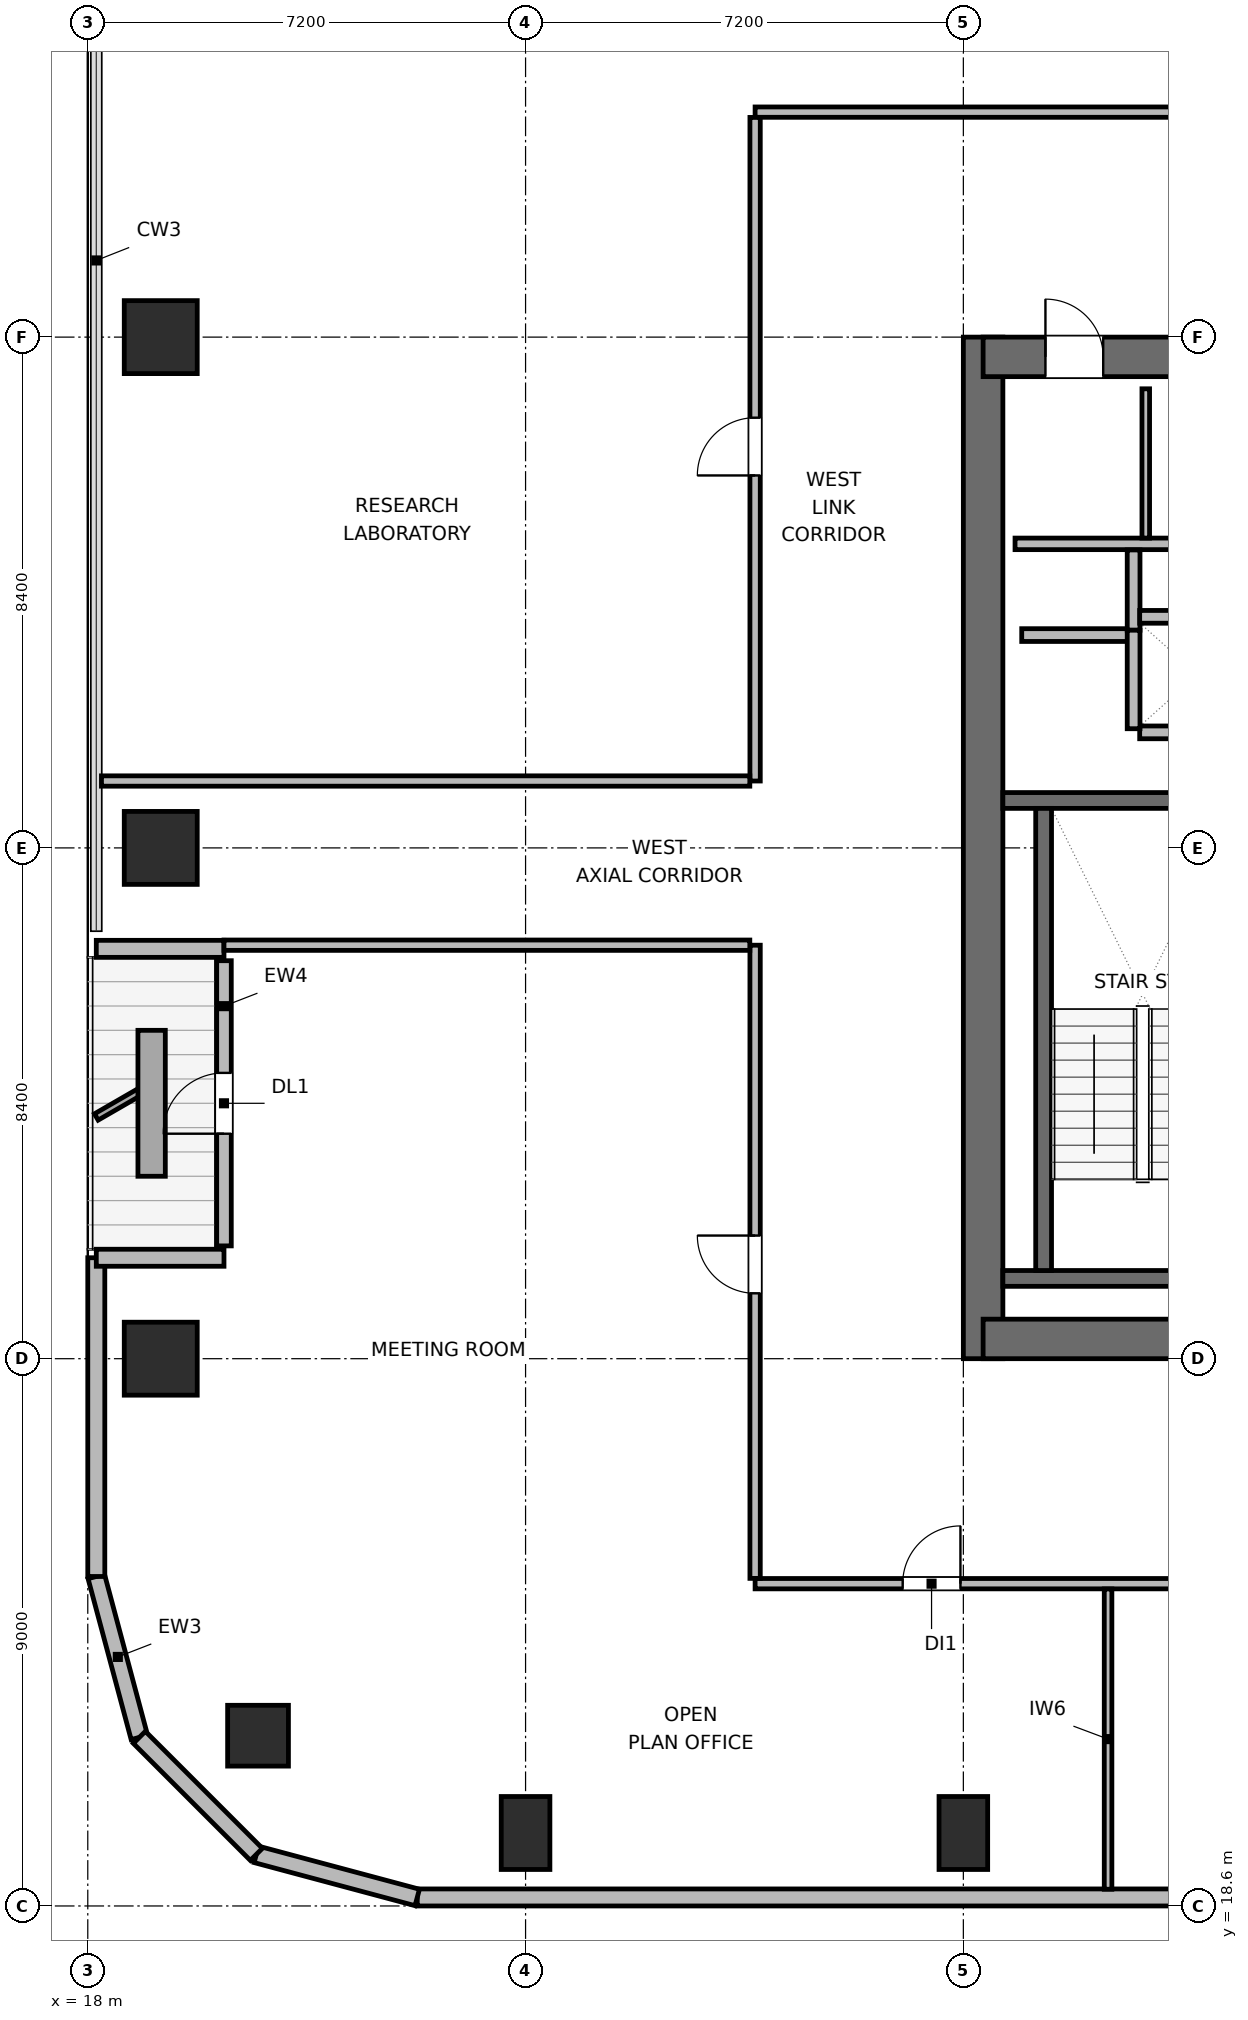
"""IFC4 building model, lengths in metres.
Left out: names, types, materials, properties, quantities, classifications, styles, units other than length and angle.
Written with IfcOpenShell. Run it as: python <this file> out.ifc"""

import sys

from ifc_helpers import new_model, si_unit, direction, frame, frame_2d, origin, origin_2d, place, context, subcontext, project, spatial, rectangle, circle, extrude, element, fill, save


model = new_model("IFC4")
c1 = context("Model", 3, precision=1e-05, world=origin(), true_north=direction((0.0, 1.0)))
c2 = subcontext(c1, "Body", "Model", "MODEL_VIEW")
j1 = project(units=[si_unit("LENGTHUNIT", "METRE"), si_unit("PLANEANGLEUNIT", "RADIAN")], contexts=[c1])
p1 = place(None, origin())
s1 = spatial("IfcSite", under=j1, at=p1, CompositionType="ELEMENT")
p2 = place(p1, origin())
s2 = spatial("IfcBuilding", under=s1, at=p2, CompositionType="ELEMENT")
p3 = place(p2, frame((0.0, 0.0, 201.9)))
s3 = spatial("IfcBuildingStorey", under=s2, at=p3, CompositionType="ELEMENT", Elevation=201.9)
p4 = place(p3, frame((32.725, 27.6, 0.0), z_axis=(0.0, 0.0, 1.0), x_axis=(0.0, 1.0, 0.0)))
e1 = element("IfcWall", 1, at=p4, inside=s3, PredefinedType="SHEAR", context=c2, shape_type="SweptSolid", body=[
    extrude(rectangle(XDim=16.8, YDim=0.65, at=frame_2d((8.4, 0.0))), origin(), (0.0, 0.0, 1.0), 3.9),
])
p5 = place(p3, frame((32.725, 27.925, 0.0), z_axis=(0.0, 0.0, 1.0), x_axis=(1.0, 0.0, 0.0)))
e2 = element("IfcWall", 2, at=p5, inside=s3, PredefinedType="SHEAR", context=c2, shape_type="SweptSolid", body=[
    extrude(rectangle(XDim=9.35, YDim=0.65, at=frame_2d((4.675, 0.0))), origin(), (0.0, 0.0, 1.0), 3.9),
])
p6 = place(p5, frame((5.025, 0.0, 0.0)))
e3 = element("IfcOpeningElement", 3, at=p6, cuts=e2, PredefinedType="OPENING", context=c2, shape_type="SweptSolid", body=[
    extrude(rectangle(XDim=1.05, YDim=2.04, at=frame_2d((0.525, 1.02))), frame((0.0, 0.335, 0.0), z_axis=(0.0, -1.0, 0.0), x_axis=(1.0, 0.0, 0.0)), (0.0, 0.0, 1.0), 0.67),
])
p7 = place(p3, frame((32.725, 44.075, 0.0), z_axis=(0.0, 0.0, 1.0), x_axis=(1.0, 0.0, 0.0)))
e4 = element("IfcWall", 4, at=p7, inside=s3, PredefinedType="SHEAR", context=c2, shape_type="SweptSolid", body=[
    extrude(rectangle(XDim=9.35, YDim=0.65, at=frame_2d((4.675, 0.0))), origin(), (0.0, 0.0, 1.0), 3.9),
])
p8 = place(p7, frame((1.025, 0.0, 0.0)))
e5 = element("IfcOpeningElement", 5, at=p8, cuts=e4, PredefinedType="OPENING", context=c2, shape_type="SweptSolid", body=[
    extrude(rectangle(XDim=0.95, YDim=2.04, at=frame_2d((0.475, 1.02))), frame((0.0, 0.335, 0.0), z_axis=(0.0, -1.0, 0.0), x_axis=(1.0, 0.0, 0.0)), (0.0, 0.0, 1.0), 0.67),
])
p9 = place(p7, frame((4.275, 0.0, 0.0)))
e6 = element("IfcOpeningElement", 6, at=p9, cuts=e4, PredefinedType="OPENING", context=c2, shape_type="SweptSolid", body=[
    extrude(rectangle(XDim=0.9, YDim=2.02, at=frame_2d((0.45, 1.01))), frame((0.0, 0.335, 0.0), z_axis=(0.0, -1.0, 0.0), x_axis=(1.0, 0.0, 0.0)), (0.0, 0.0, 1.0), 0.67),
])
p10 = place(p7, frame((7.175, 0.0, 0.0)))
e7 = element("IfcOpeningElement", 7, at=p10, cuts=e4, PredefinedType="OPENING", context=c2, shape_type="SweptSolid", body=[
    extrude(rectangle(XDim=0.9, YDim=2.02, at=frame_2d((0.45, 1.01))), frame((0.0, 0.335, 0.0), z_axis=(0.0, -1.0, 0.0), x_axis=(1.0, 0.0, 0.0)), (0.0, 0.0, 1.0), 0.67),
])
for number, where, z_axis, x_axis in (
    (8, (33.05, 28.92, 0.0), (0.0, 0.0, 1.0), (1.0, 0.0, 0.0)),
    (9, (33.05, 36.78, 0.0), (0.0, 0.0, 1.0), (1.0, 0.0, 0.0)),
):
    element("IfcWall", number, at=place(p3, frame(where, z_axis=z_axis, x_axis=x_axis)), inside=s3, PredefinedType="SHEAR", context=c2, shape_type="SweptSolid", body=[
        extrude(rectangle(XDim=4.06, YDim=0.26, at=frame_2d((2.03, 0.0))), origin(), (0.0, 0.0, 1.0), 3.9),
    ])
p11 = place(p3, frame((33.72, 29.05, 0.0), z_axis=(0.0, 0.0, 1.0), x_axis=(0.0, 1.0, 0.0)))
e10 = element("IfcWall", 10, at=p11, inside=s3, PredefinedType="SHEAR", context=c2, shape_type="SweptSolid", body=[
    extrude(rectangle(XDim=7.6, YDim=0.26, at=frame_2d((3.8, 0.0))), origin(), (0.0, 0.0, 1.0), 3.9),
])
p12 = place(p3, frame((20.8, 21.4, 0.0), z_axis=(0.0, 0.0, 1.0), x_axis=(1.0, 0.0, 0.0)))
e11 = element("IfcColumn", 11, at=p12, inside=s3, PredefinedType="COLUMN", context=c2, shape_type="SweptSolid", body=[
    extrude(circle(Radius=0.5, at=origin_2d()), origin(), (0.0, 0.0, 1.0), 3.9),
])
for number, where, z_axis, x_axis in (
    (12, (25.2, 19.8, 0.0), (0.0, 0.0, 1.0), (1.0, 0.0, 0.0)),
    (13, (32.4, 19.8, 0.0), (0.0, 0.0, 1.0), (1.0, 0.0, 0.0)),
):
    element("IfcColumn", number, at=place(p3, frame(where, z_axis=z_axis, x_axis=x_axis)), inside=s3, PredefinedType="COLUMN", context=c2, shape_type="SweptSolid", body=[
        extrude(rectangle(XDim=0.8, YDim=1.2, at=origin_2d()), origin(), (0.0, 0.0, 1.0), 3.9),
    ])
for number, where, z_axis, x_axis in (
    (14, (19.2, 27.6, 0.0), (0.0, 0.0, 1.0), (1.0, 0.0, 0.0)),
    (15, (19.2, 36.0, 0.0), (0.0, 0.0, 1.0), (1.0, 0.0, 0.0)),
    (16, (19.2, 44.4, 0.0), (0.0, 0.0, 1.0), (1.0, 0.0, 0.0)),
):
    element("IfcColumn", number, at=place(p3, frame(where, z_axis=z_axis, x_axis=x_axis)), inside=s3, PredefinedType="COLUMN", context=c2, shape_type="SweptSolid", body=[
        extrude(rectangle(XDim=1.2, YDim=1.2, at=origin_2d()), origin(), (0.0, 0.0, 1.0), 3.9),
    ])
p13 = place(p3, frame((18.848, 21.373, 0.0), z_axis=(0.0, 0.0, 1.0), x_axis=(-0.258672222976, 0.9659651552, 0.0)))
e17 = element("IfcWall", 17, at=p13, inside=s3, PredefinedType="SOLIDWALL", context=c2, shape_type="SweptSolid", body=[
    extrude(rectangle(XDim=2.739, YDim=0.28, at=frame_2d((1.37, 0.0))), origin(), (0.0, 0.0, 1.0), 3.68),
])
p14 = place(p3, frame((18.14, 24.018, 0.0), z_axis=(0.0, 0.0, 1.0), x_axis=(0.0, 1.0, 0.0)))
e18 = element("IfcWall", 18, at=p14, inside=s3, PredefinedType="SOLIDWALL", context=c2, shape_type="SweptSolid", body=[
    extrude(rectangle(XDim=5.242, YDim=0.28, at=frame_2d((2.621, 0.0))), origin(), (0.0, 0.0, 1.0), 3.68),
])
p15 = place(p3, frame((18.14, 29.26, 0.0), z_axis=(0.0, 0.0, 1.0), x_axis=(1.0, 0.0, 0.0)))
e19 = element("IfcWall", 19, at=p15, inside=s3, PredefinedType="SOLIDWALL", context=c2, shape_type="SweptSolid", body=[
    extrude(rectangle(XDim=2.1, YDim=0.28, at=frame_2d((1.05, 0.0))), origin(), (0.0, 0.0, 1.0), 3.116),
])
p16 = place(p3, frame((20.24, 29.455, 0.0), z_axis=(0.0, 0.0, 1.0), x_axis=(0.0, 1.0, 0.0)))
e20 = element("IfcWall", 20, at=p16, inside=s3, PredefinedType="SOLIDWALL", context=c2, shape_type="SweptSolid", body=[
    extrude(rectangle(XDim=4.69, YDim=0.24, at=frame_2d((2.345, 0.0))), origin(), (0.0, 0.0, 1.0), 3.248),
])
p17 = place(p16, frame((1.845, 0.0, 0.0)))
e21 = element("IfcOpeningElement", 21, at=p17, cuts=e20, PredefinedType="OPENING", context=c2, shape_type="SweptSolid", body=[
    extrude(rectangle(XDim=1.0, YDim=2.02, at=frame_2d((0.5, 1.01))), frame((0.0, 0.13, 0.0), z_axis=(0.0, -1.0, 0.0), x_axis=(1.0, 0.0, 0.0)), (0.0, 0.0, 1.0), 0.26),
])
p18 = place(p3, frame((20.24, 34.34, 0.0), z_axis=(0.0, 0.0, 1.0), x_axis=(-1.0, 0.0, 0.0)))
e22 = element("IfcWall", 22, at=p18, inside=s3, PredefinedType="SOLIDWALL", context=c2, shape_type="SweptSolid", body=[
    extrude(rectangle(XDim=2.1, YDim=0.28, at=frame_2d((1.05, 0.0))), origin(), (0.0, 0.0, 1.0), 3.116),
])
p19 = place(p3, frame((41.36, 18.74, 0.0), z_axis=(0.0, 0.0, 1.0), x_axis=(-1.0, 0.0, 0.0)))
e23 = element("IfcWall", 23, at=p19, inside=s3, PredefinedType="SOLIDWALL", context=c2, shape_type="SweptSolid", body=[
    extrude(rectangle(XDim=17.942, YDim=0.28, at=frame_2d((8.971, 0.0))), origin(), (0.0, 0.0, 1.0), 3.68),
])
p20 = place(p3, frame((23.418, 18.74, 0.0), z_axis=(0.0, 0.0, 1.0), x_axis=(-0.965971118627, 0.258649952598, 0.0)))
e24 = element("IfcWall", 24, at=p20, inside=s3, PredefinedType="SOLIDWALL", context=c2, shape_type="SweptSolid", body=[
    extrude(rectangle(XDim=2.739, YDim=0.28, at=frame_2d((1.37, 0.0))), origin(), (0.0, 0.0, 1.0), 3.68),
])
p21 = place(p3, frame((20.772, 19.448, 0.0), z_axis=(0.0, 0.0, 1.0), x_axis=(-0.707106781187, 0.707106781187, 0.0)))
e25 = element("IfcWall", 25, at=p21, inside=s3, PredefinedType="SOLIDWALL", context=c2, shape_type="SweptSolid", body=[
    extrude(rectangle(XDim=2.721, YDim=0.28, at=frame_2d((1.36, 0.0))), origin(), (0.0, 0.0, 1.0), 3.68),
])
p22 = place(p3, frame((33.25, 41.0, 0.0), z_axis=(0.0, 0.0, 1.0), x_axis=(1.0, 0.0, 0.0)))
e26 = element("IfcWall", 26, at=p22, inside=s3, PredefinedType="PLUMBINGWALL", context=c2, shape_type="SweptSolid", body=[
    extrude(rectangle(XDim=8.3, YDim=0.19, at=frame_2d((4.15, 0.0))), origin(), (0.0, 0.0, 1.0), 3.68),
])
p23 = place(p3, frame((35.4, 41.095, 0.0), z_axis=(0.0, 0.0, 1.0), x_axis=(0.0, 1.0, 0.0)))
e27 = element("IfcWall", 27, at=p23, inside=s3, PredefinedType="PARTITIONING", context=c2, shape_type="SweptSolid", body=[
    extrude(rectangle(XDim=2.455, YDim=0.125, at=frame_2d((1.228, 0.0))), origin(), (0.0, 0.0, 1.0), 3.68),
])
p24 = place(p3, frame((33.36, 39.5, 0.0), z_axis=(0.0, 0.0, 1.0), x_axis=(1.0, 0.0, 0.0)))
e28 = element("IfcWall", 28, at=p24, inside=s3, PredefinedType="PARTITIONING", context=c2, shape_type="SweptSolid", body=[
    extrude(rectangle(XDim=1.86, YDim=0.21, at=frame_2d((0.93, 0.0))), origin(), (0.0, 0.0, 1.0), 3.68),
])
p25 = place(p3, frame((35.2, 39.58, 0.0), z_axis=(0.0, 0.0, 1.0), x_axis=(0.0, 1.0, 0.0)))
e29 = element("IfcWall", 29, at=p25, inside=s3, PredefinedType="PARTITIONING", context=c2, shape_type="SweptSolid", body=[
    extrude(rectangle(XDim=1.32, YDim=0.21, at=frame_2d((0.66, 0.0))), origin(), (0.0, 0.0, 1.0), 3.68),
])
for number, where, z_axis, x_axis in (
    (30, (35.3, 37.9, 0.0), (0.0, 0.0, 1.0), (1.0, 0.0, 0.0)),
    (31, (35.3, 39.8, 0.0), (0.0, 0.0, 1.0), (1.0, 0.0, 0.0)),
):
    element("IfcWall", number, at=place(p3, frame(where, z_axis=z_axis, x_axis=x_axis)), inside=s3, PredefinedType="PARTITIONING", context=c2, shape_type="SweptSolid", body=[
        extrude(rectangle(XDim=1.9, YDim=0.21, at=frame_2d((0.95, 0.0))), origin(), (0.0, 0.0, 1.0), 3.68),
    ])
p26 = place(p3, frame((35.2, 37.96, 0.0), z_axis=(0.0, 0.0, 1.0), x_axis=(0.0, 1.0, 0.0)))
e32 = element("IfcWall", 32, at=p26, inside=s3, PredefinedType="PARTITIONING", context=c2, shape_type="SweptSolid", body=[
    extrude(rectangle(XDim=1.62, YDim=0.21, at=frame_2d((0.81, 0.0))), origin(), (0.0, 0.0, 1.0), 3.68),
])
p27 = place(p3, frame((28.975, 23.9, 0.0), z_axis=(0.0, 0.0, 1.0), x_axis=(1.0, 0.0, 0.0)))
e33 = element("IfcWall", 33, at=p27, inside=s3, PredefinedType="PARTITIONING", context=c2, shape_type="SweptSolid", body=[
    extrude(rectangle(XDim=34.625, YDim=0.17, at=frame_2d((17.312, 0.0))), origin(), (0.0, 0.0, 1.0), 3.68),
])
p28 = place(p27, frame((2.427, 0.0, 0.0)))
e34 = element("IfcOpeningElement", 34, at=p28, cuts=e33, PredefinedType="OPENING", context=c2, shape_type="SweptSolid", body=[
    extrude(rectangle(XDim=0.95, YDim=2.04, at=frame_2d((0.475, 1.02))), frame((0.0, 0.095, 0.0), z_axis=(0.0, -1.0, 0.0), x_axis=(1.0, 0.0, 0.0)), (0.0, 0.0, 1.0), 0.19),
])
p29 = place(p27, frame((7.63, 0.0, 0.0)))
e35 = element("IfcOpeningElement", 35, at=p29, cuts=e33, PredefinedType="OPENING", context=c2, shape_type="SweptSolid", body=[
    extrude(rectangle(XDim=0.95, YDim=2.04, at=frame_2d((0.475, 1.02))), frame((0.0, 0.095, 0.0), z_axis=(0.0, -1.0, 0.0), x_axis=(1.0, 0.0, 0.0)), (0.0, 0.0, 1.0), 0.19),
])
p30 = place(p27, frame((14.535, 0.0, 0.0)))
e36 = element("IfcOpeningElement", 36, at=p30, cuts=e33, PredefinedType="OPENING", context=c2, shape_type="SweptSolid", body=[
    extrude(rectangle(XDim=0.95, YDim=2.04, at=frame_2d((0.475, 1.02))), frame((0.0, 0.095, 0.0), z_axis=(0.0, -1.0, 0.0), x_axis=(1.0, 0.0, 0.0)), (0.0, 0.0, 1.0), 0.19),
])
p31 = place(p27, frame((21.44, 0.0, 0.0)))
e37 = element("IfcOpeningElement", 37, at=p31, cuts=e33, PredefinedType="OPENING", context=c2, shape_type="SweptSolid", body=[
    extrude(rectangle(XDim=0.95, YDim=2.04, at=frame_2d((0.475, 1.02))), frame((0.0, 0.095, 0.0), z_axis=(0.0, -1.0, 0.0), x_axis=(1.0, 0.0, 0.0)), (0.0, 0.0, 1.0), 0.19),
])
p32 = place(p27, frame((26.045, 0.0, 0.0)))
e38 = element("IfcOpeningElement", 38, at=p32, cuts=e33, PredefinedType="OPENING", context=c2, shape_type="SweptSolid", body=[
    extrude(rectangle(XDim=0.95, YDim=2.04, at=frame_2d((0.475, 1.02))), frame((0.0, 0.095, 0.0), z_axis=(0.0, -1.0, 0.0), x_axis=(1.0, 0.0, 0.0)), (0.0, 0.0, 1.0), 0.19),
])
p33 = place(p27, frame((31.25, 0.0, 0.0)))
e39 = element("IfcOpeningElement", 39, at=p33, cuts=e33, PredefinedType="OPENING", context=c2, shape_type="SweptSolid", body=[
    extrude(rectangle(XDim=0.95, YDim=2.04, at=frame_2d((0.475, 1.02))), frame((0.0, 0.095, 0.0), z_axis=(0.0, -1.0, 0.0), x_axis=(1.0, 0.0, 0.0)), (0.0, 0.0, 1.0), 0.19),
])
p34 = place(p3, frame((28.975, 48.1, 0.0), z_axis=(0.0, 0.0, 1.0), x_axis=(1.0, 0.0, 0.0)))
e40 = element("IfcWall", 40, at=p34, inside=s3, PredefinedType="PARTITIONING", context=c2, shape_type="SweptSolid", body=[
    extrude(rectangle(XDim=34.625, YDim=0.17, at=frame_2d((17.312, 0.0))), origin(), (0.0, 0.0, 1.0), 3.68),
])
p35 = place(p34, frame((6.832, 0.0, 0.0)))
e41 = element("IfcOpeningElement", 41, at=p35, cuts=e40, PredefinedType="OPENING", context=c2, shape_type="SweptSolid", body=[
    extrude(rectangle(XDim=0.95, YDim=2.04, at=frame_2d((0.475, 1.02))), frame((0.0, 0.095, 0.0), z_axis=(0.0, -1.0, 0.0), x_axis=(1.0, 0.0, 0.0)), (0.0, 0.0, 1.0), 0.19),
])
p36 = place(p34, frame((17.245, 0.0, 0.0)))
e42 = element("IfcOpeningElement", 42, at=p36, cuts=e40, PredefinedType="OPENING", context=c2, shape_type="SweptSolid", body=[
    extrude(rectangle(XDim=0.95, YDim=2.04, at=frame_2d((0.475, 1.02))), frame((0.0, 0.095, 0.0), z_axis=(0.0, -1.0, 0.0), x_axis=(1.0, 0.0, 0.0)), (0.0, 0.0, 1.0), 0.19),
])
p37 = place(p34, frame((21.475, 0.0, 0.0)))
e43 = element("IfcOpeningElement", 43, at=p37, cuts=e40, PredefinedType="OPENING", context=c2, shape_type="SweptSolid", body=[
    extrude(rectangle(XDim=0.95, YDim=2.04, at=frame_2d((0.475, 1.02))), frame((0.0, 0.095, 0.0), z_axis=(0.0, -1.0, 0.0), x_axis=(1.0, 0.0, 0.0)), (0.0, 0.0, 1.0), 0.19),
])
p38 = place(p34, frame((28.375, 0.0, 0.0)))
e44 = element("IfcOpeningElement", 44, at=p38, cuts=e40, PredefinedType="OPENING", context=c2, shape_type="SweptSolid", body=[
    extrude(rectangle(XDim=0.95, YDim=2.04, at=frame_2d((0.475, 1.02))), frame((0.0, 0.095, 0.0), z_axis=(0.0, -1.0, 0.0), x_axis=(1.0, 0.0, 0.0)), (0.0, 0.0, 1.0), 0.19),
])
p39 = place(p3, frame((28.975, 23.987, 0.0), z_axis=(0.0, 0.0, 1.0), x_axis=(0.0, 1.0, 0.0)))
e45 = element("IfcWall", 45, at=p39, inside=s3, PredefinedType="PARTITIONING", context=c2, shape_type="SweptSolid", body=[
    extrude(rectangle(XDim=10.413, YDim=0.17, at=frame_2d((5.207, 0.0))), origin(), (0.0, 0.0, 1.0), 3.68),
])
p40 = place(p39, frame((4.688, 0.0, 0.0)))
e46 = element("IfcOpeningElement", 46, at=p40, cuts=e45, PredefinedType="OPENING", context=c2, shape_type="SweptSolid", body=[
    extrude(rectangle(XDim=0.95, YDim=2.04, at=frame_2d((0.475, 1.02))), frame((0.0, 0.095, 0.0), z_axis=(0.0, -1.0, 0.0), x_axis=(1.0, 0.0, 0.0)), (0.0, 0.0, 1.0), 0.19),
])
p41 = place(p3, frame((28.975, 37.1, 0.0), z_axis=(0.0, 0.0, 1.0), x_axis=(0.0, 1.0, 0.0)))
e47 = element("IfcWall", 47, at=p41, inside=s3, PredefinedType="PARTITIONING", context=c2, shape_type="SweptSolid", body=[
    extrude(rectangle(XDim=10.913, YDim=0.17, at=frame_2d((5.457, 0.0))), origin(), (0.0, 0.0, 1.0), 3.68),
])
p42 = place(p41, frame((5.025, 0.0, 0.0)))
e48 = element("IfcOpeningElement", 48, at=p42, cuts=e47, PredefinedType="OPENING", context=c2, shape_type="SweptSolid", body=[
    extrude(rectangle(XDim=0.95, YDim=2.04, at=frame_2d((0.475, 1.02))), frame((0.0, 0.095, 0.0), z_axis=(0.0, -1.0, 0.0), x_axis=(1.0, 0.0, 0.0)), (0.0, 0.0, 1.0), 0.19),
])
p43 = place(p3, frame((34.78, 18.875, 0.0), z_axis=(0.0, 0.0, 1.0), x_axis=(0.0, 1.0, 0.0)))
e49 = element("IfcWall", 49, at=p43, inside=s3, PredefinedType="PARTITIONING", context=c2, shape_type="SweptSolid", body=[
    extrude(rectangle(XDim=4.938, YDim=0.125, at=frame_2d((2.469, 0.0))), origin(), (0.0, 0.0, 1.0), 3.68),
])
p44 = place(p3, frame((20.24, 34.4, 0.0), z_axis=(0.0, 0.0, 1.0), x_axis=(1.0, 0.0, 0.0)))
e50 = element("IfcWall", 50, at=p44, inside=s3, PredefinedType="PARTITIONING", context=c2, shape_type="SweptSolid", body=[
    extrude(rectangle(XDim=8.648, YDim=0.17, at=frame_2d((4.324, 0.0))), origin(), (0.0, 0.0, 1.0), 3.68),
])
p45 = place(p3, frame((18.225, 37.1, 0.0), z_axis=(0.0, 0.0, 1.0), x_axis=(1.0, 0.0, 0.0)))
e51 = element("IfcWall", 51, at=p45, inside=s3, PredefinedType="PARTITIONING", context=c2, shape_type="SweptSolid", body=[
    extrude(rectangle(XDim=10.663, YDim=0.17, at=frame_2d((5.332, 0.0))), origin(), (0.0, 0.0, 1.0), 3.68),
])
p46 = place(p17, origin())
e52 = element("IfcDoor", 52, at=p46, inside=s3, OperationType="SINGLE_SWING_LEFT", PredefinedType="DOOR", context=c2, shape_type="SweptSolid", body=[
    extrude(rectangle(XDim=1.0, YDim=2.02, at=frame_2d((0.5, 1.01))), frame((0.0, 0.025, 0.0), z_axis=(0.0, -1.0, 0.0), x_axis=(1.0, 0.0, 0.0)), (0.0, 0.0, 1.0), 0.05),
])
fill(e21, e52)
p47 = place(p8, origin())
e53 = element("IfcDoor", 53, at=p47, inside=s3, OperationType="SINGLE_SWING_LEFT", PredefinedType="DOOR", context=c2, shape_type="SweptSolid", body=[
    extrude(rectangle(XDim=0.95, YDim=2.04, at=frame_2d((0.475, 1.02))), frame((0.0, 0.025, 0.0), z_axis=(0.0, -1.0, 0.0), x_axis=(1.0, 0.0, 0.0)), (0.0, 0.0, 1.0), 0.05),
])
fill(e5, e53)
p48 = place(p28, origin())
e54 = element("IfcDoor", 54, at=p48, inside=s3, OperationType="SINGLE_SWING_RIGHT", PredefinedType="DOOR", context=c2, shape_type="SweptSolid", body=[
    extrude(rectangle(XDim=0.95, YDim=2.04, at=frame_2d((0.475, 1.02))), frame((0.0, 0.025, 0.0), z_axis=(0.0, -1.0, 0.0), x_axis=(1.0, 0.0, 0.0)), (0.0, 0.0, 1.0), 0.05),
])
fill(e34, e54)
p49 = place(p40, origin())
e55 = element("IfcDoor", 55, at=p49, inside=s3, OperationType="SINGLE_SWING_RIGHT", PredefinedType="DOOR", context=c2, shape_type="SweptSolid", body=[
    extrude(rectangle(XDim=0.95, YDim=2.04, at=frame_2d((0.475, 1.02))), frame((0.0, 0.025, 0.0), z_axis=(0.0, -1.0, 0.0), x_axis=(1.0, 0.0, 0.0)), (0.0, 0.0, 1.0), 0.05),
])
fill(e46, e55)
p50 = place(p42, origin())
e56 = element("IfcDoor", 56, at=p50, inside=s3, OperationType="SINGLE_SWING_LEFT", PredefinedType="DOOR", context=c2, shape_type="SweptSolid", body=[
    extrude(rectangle(XDim=0.95, YDim=2.04, at=frame_2d((0.475, 1.02))), frame((0.0, 0.025, 0.0), z_axis=(0.0, -1.0, 0.0), x_axis=(1.0, 0.0, 0.0)), (0.0, 0.0, 1.0), 0.05),
])
fill(e48, e56)
save(model, sys.argv[1])
